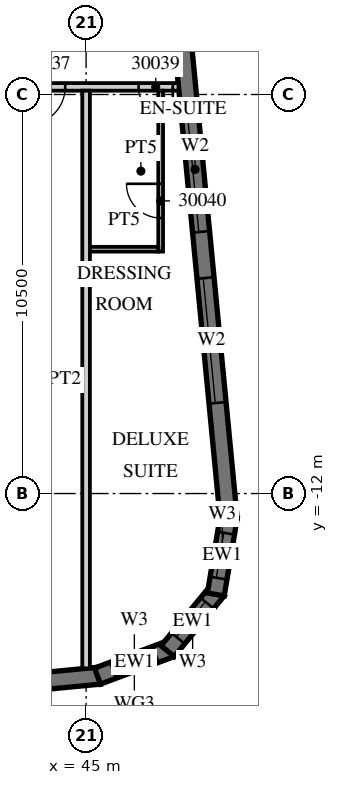
"""IFC4 building model, lengths in metres.
Left out: names, types, materials, properties, quantities, classifications, styles, units other than length and angle.
Written with IfcOpenShell. Run it as: python <this file> out.ifc"""

import sys

from ifc_helpers import new_model, si_unit, direction, frame, frame_2d, origin, place, context, subcontext, project, spatial, polyline, rectangle, outline, extrude, element, fill, save


model = new_model("IFC4")
c1 = context("Model", 3, precision=1e-05, world=origin(), true_north=direction((0.0, 1.0)))
c2 = subcontext(c1, "Body", "Model", "MODEL_VIEW")
j1 = project(units=[si_unit("LENGTHUNIT", "METRE"), si_unit("PLANEANGLEUNIT", "RADIAN")], contexts=[c1])
p1 = place(None, origin())
s1 = spatial("IfcSite", under=j1, at=p1, CompositionType="ELEMENT")
p2 = place(p1, origin())
s2 = spatial("IfcBuilding", under=s1, at=p2, CompositionType="ELEMENT")
p3 = place(p2, frame((0.0, 0.0, 133.9)))
s3 = spatial("IfcBuildingStorey", under=s2, at=p3, CompositionType="ELEMENT", Elevation=133.9)
p4 = place(p3, frame((-13.521, -22.46, 0.0), z_axis=(0.0, 0.0, 1.0), x_axis=(0.995396096335, 0.095846812164, 0.0)))
e1 = element("IfcWall", 1, at=p4, inside=s3, PredefinedType="SOLIDWALL", context=c2, shape_type="SweptSolid", body=[
    extrude(rectangle(XDim=59.151, YDim=0.45, at=frame_2d((29.575, 0.0))), origin(), (0.0, 0.0, 1.0), 3.02),
])
p5 = place(p4, frame((0.91, 0.0, 0.45)))
e2 = element("IfcOpeningElement", 2, at=p5, cuts=e1, PredefinedType="OPENING", context=c2, shape_type="SweptSolid", body=[
    extrude(rectangle(XDim=2.7, YDim=2.25, at=frame_2d((1.35, 1.125))), frame((0.0, 0.235, 0.0), z_axis=(0.0, -1.0, 0.0), x_axis=(1.0, 0.0, 0.0)), (0.0, 0.0, 1.0), 0.47),
])
p6 = place(p4, frame((5.431, 0.0, 0.45)))
e3 = element("IfcOpeningElement", 3, at=p6, cuts=e1, PredefinedType="OPENING", context=c2, shape_type="SweptSolid", body=[
    extrude(rectangle(XDim=2.7, YDim=2.25, at=frame_2d((1.35, 1.125))), frame((0.0, 0.235, 0.0), z_axis=(0.0, -1.0, 0.0), x_axis=(1.0, 0.0, 0.0)), (0.0, 0.0, 1.0), 0.47),
])
p7 = place(p4, frame((9.952, 0.0, 0.45)))
e4 = element("IfcOpeningElement", 4, at=p7, cuts=e1, PredefinedType="OPENING", context=c2, shape_type="SweptSolid", body=[
    extrude(rectangle(XDim=2.7, YDim=2.25, at=frame_2d((1.35, 1.125))), frame((0.0, 0.235, 0.0), z_axis=(0.0, -1.0, 0.0), x_axis=(1.0, 0.0, 0.0)), (0.0, 0.0, 1.0), 0.47),
])
p8 = place(p4, frame((14.473, 0.0, 0.45)))
e5 = element("IfcOpeningElement", 5, at=p8, cuts=e1, PredefinedType="OPENING", context=c2, shape_type="SweptSolid", body=[
    extrude(rectangle(XDim=2.7, YDim=2.25, at=frame_2d((1.35, 1.125))), frame((0.0, 0.235, 0.0), z_axis=(0.0, -1.0, 0.0), x_axis=(1.0, 0.0, 0.0)), (0.0, 0.0, 1.0), 0.47),
])
p9 = place(p4, frame((18.994, 0.0, 0.45)))
e6 = element("IfcOpeningElement", 6, at=p9, cuts=e1, PredefinedType="OPENING", context=c2, shape_type="SweptSolid", body=[
    extrude(rectangle(XDim=2.7, YDim=2.25, at=frame_2d((1.35, 1.125))), frame((0.0, 0.235, 0.0), z_axis=(0.0, -1.0, 0.0), x_axis=(1.0, 0.0, 0.0)), (0.0, 0.0, 1.0), 0.47),
])
p10 = place(p4, frame((23.514, 0.0, 0.45)))
e7 = element("IfcOpeningElement", 7, at=p10, cuts=e1, PredefinedType="OPENING", context=c2, shape_type="SweptSolid", body=[
    extrude(rectangle(XDim=2.7, YDim=2.25, at=frame_2d((1.35, 1.125))), frame((0.0, 0.235, 0.0), z_axis=(0.0, -1.0, 0.0), x_axis=(1.0, 0.0, 0.0)), (0.0, 0.0, 1.0), 0.47),
])
p11 = place(p4, frame((28.035, 0.0, 0.45)))
e8 = element("IfcOpeningElement", 8, at=p11, cuts=e1, PredefinedType="OPENING", context=c2, shape_type="SweptSolid", body=[
    extrude(rectangle(XDim=2.7, YDim=2.25, at=frame_2d((1.35, 1.125))), frame((0.0, 0.235, 0.0), z_axis=(0.0, -1.0, 0.0), x_axis=(1.0, 0.0, 0.0)), (0.0, 0.0, 1.0), 0.47),
])
p12 = place(p4, frame((32.556, 0.0, 0.45)))
e9 = element("IfcOpeningElement", 9, at=p12, cuts=e1, PredefinedType="OPENING", context=c2, shape_type="SweptSolid", body=[
    extrude(rectangle(XDim=2.7, YDim=2.25, at=frame_2d((1.35, 1.125))), frame((0.0, 0.235, 0.0), z_axis=(0.0, -1.0, 0.0), x_axis=(1.0, 0.0, 0.0)), (0.0, 0.0, 1.0), 0.47),
])
p13 = place(p4, frame((37.077, 0.0, 0.45)))
e10 = element("IfcOpeningElement", 10, at=p13, cuts=e1, PredefinedType="OPENING", context=c2, shape_type="SweptSolid", body=[
    extrude(rectangle(XDim=2.7, YDim=2.25, at=frame_2d((1.35, 1.125))), frame((0.0, 0.235, 0.0), z_axis=(0.0, -1.0, 0.0), x_axis=(1.0, 0.0, 0.0)), (0.0, 0.0, 1.0), 0.47),
])
p14 = place(p4, frame((41.598, 0.0, 0.45)))
e11 = element("IfcOpeningElement", 11, at=p14, cuts=e1, PredefinedType="OPENING", context=c2, shape_type="SweptSolid", body=[
    extrude(rectangle(XDim=2.7, YDim=2.25, at=frame_2d((1.35, 1.125))), frame((0.0, 0.235, 0.0), z_axis=(0.0, -1.0, 0.0), x_axis=(1.0, 0.0, 0.0)), (0.0, 0.0, 1.0), 0.47),
])
p15 = place(p4, frame((46.118, 0.0, 0.45)))
e12 = element("IfcOpeningElement", 12, at=p15, cuts=e1, PredefinedType="OPENING", context=c2, shape_type="SweptSolid", body=[
    extrude(rectangle(XDim=2.7, YDim=2.25, at=frame_2d((1.35, 1.125))), frame((0.0, 0.235, 0.0), z_axis=(0.0, -1.0, 0.0), x_axis=(1.0, 0.0, 0.0)), (0.0, 0.0, 1.0), 0.47),
])
p16 = place(p4, frame((50.639, 0.0, 0.45)))
e13 = element("IfcOpeningElement", 13, at=p16, cuts=e1, PredefinedType="OPENING", context=c2, shape_type="SweptSolid", body=[
    extrude(rectangle(XDim=2.7, YDim=2.25, at=frame_2d((1.35, 1.125))), frame((0.0, 0.235, 0.0), z_axis=(0.0, -1.0, 0.0), x_axis=(1.0, 0.0, 0.0)), (0.0, 0.0, 1.0), 0.47),
])
p17 = place(p4, frame((55.15, 0.0, 0.45)))
e14 = element("IfcOpeningElement", 14, at=p17, cuts=e1, PredefinedType="OPENING", context=c2, shape_type="SweptSolid", body=[
    extrude(rectangle(XDim=2.7, YDim=2.25, at=frame_2d((1.35, 1.125))), frame((0.0, 0.235, 0.0), z_axis=(0.0, -1.0, 0.0), x_axis=(1.0, 0.0, 0.0)), (0.0, 0.0, 1.0), 0.47),
])
p18 = place(p3, frame((45.3, -16.804, 0.0), z_axis=(0.0, 0.0, 1.0), x_axis=(0.936677599948, 0.350192909346, 0.0)))
e15 = element("IfcWall", 15, at=p18, inside=s3, PredefinedType="SOLIDWALL", context=c2, shape_type="SweptSolid", body=[
    extrude(outline(polyline([(0.0, -0.225), (2.071, -0.225), (1.95, 0.225), (0.121, 0.225), (0.0, -0.225)])), origin(), (0.0, 0.0, 1.0), 3.02),
])
p19 = place(p18, frame((0.435, 0.0, 0.45)))
e16 = element("IfcOpeningElement", 16, at=p19, cuts=e15, PredefinedType="OPENING", context=c2, shape_type="SweptSolid", body=[
    extrude(rectangle(XDim=1.2, YDim=2.25, at=frame_2d((0.6, 1.125))), frame((0.0, 0.235, 0.0), z_axis=(0.0, -1.0, 0.0), x_axis=(1.0, 0.0, 0.0)), (0.0, 0.0, 1.0), 0.47),
])
p20 = place(p3, frame((47.145, -16.147, 0.0), z_axis=(0.0, 0.0, 1.0), x_axis=(0.635988241739, 0.771698747161, 0.0)))
e17 = element("IfcWall", 17, at=p20, inside=s3, PredefinedType="SOLIDWALL", context=c2, shape_type="SweptSolid", body=[
    extrude(outline(polyline([(0.0, -0.225), (2.071, -0.225), (1.95, 0.225), (0.121, 0.225), (0.0, -0.225)])), origin(), (0.0, 0.0, 1.0), 3.02),
])
p21 = place(p20, frame((0.435, 0.0, 0.45)))
e18 = element("IfcOpeningElement", 18, at=p21, cuts=e17, PredefinedType="OPENING", context=c2, shape_type="SweptSolid", body=[
    extrude(rectangle(XDim=1.2, YDim=2.25, at=frame_2d((0.6, 1.125))), frame((0.0, 0.235, 0.0), z_axis=(0.0, -1.0, 0.0), x_axis=(1.0, 0.0, 0.0)), (0.0, 0.0, 1.0), 0.47),
])
p22 = place(p3, frame((48.413, -14.655, 0.0), z_axis=(0.0, 0.0, 1.0), x_axis=(0.165068144653, 0.986282164302, 0.0)))
e19 = element("IfcWall", 19, at=p22, inside=s3, PredefinedType="SOLIDWALL", context=c2, shape_type="SweptSolid", body=[
    extrude(outline(polyline([(0.0, -0.225), (2.071, -0.225), (1.95, 0.225), (0.121, 0.225), (0.0, -0.225)])), origin(), (0.0, 0.0, 1.0), 3.02),
])
p23 = place(p22, frame((0.435, 0.0, 0.45)))
e20 = element("IfcOpeningElement", 20, at=p23, cuts=e19, PredefinedType="OPENING", context=c2, shape_type="SweptSolid", body=[
    extrude(rectangle(XDim=1.2, YDim=2.25, at=frame_2d((0.6, 1.125))), frame((0.0, 0.235, 0.0), z_axis=(0.0, -1.0, 0.0), x_axis=(1.0, 0.0, 0.0)), (0.0, 0.0, 1.0), 0.47),
])
p24 = place(p3, frame((48.753, -12.672, 0.0), z_axis=(0.0, 0.0, 1.0), x_axis=(-0.095842661909, 0.995396495954, 0.0)))
e21 = element("IfcWall", 21, at=p24, inside=s3, PredefinedType="SOLIDWALL", context=c2, shape_type="SweptSolid", body=[
    extrude(rectangle(XDim=35.0, YDim=0.45, at=frame_2d((17.5, 0.0))), origin(), (0.0, 0.0, 1.0), 3.02),
])
p25 = place(p24, frame((3.072, 0.0, 0.45)))
e22 = element("IfcOpeningElement", 22, at=p25, cuts=e21, PredefinedType="OPENING", context=c2, shape_type="SweptSolid", body=[
    extrude(rectangle(XDim=3.3, YDim=2.25, at=frame_2d((1.65, 1.125))), frame((0.0, 0.235, 0.0), z_axis=(0.0, -1.0, 0.0), x_axis=(1.0, 0.0, 0.0)), (0.0, 0.0, 1.0), 0.47),
])
p26 = place(p24, frame((7.593, 0.0, 0.45)))
e23 = element("IfcOpeningElement", 23, at=p26, cuts=e21, PredefinedType="OPENING", context=c2, shape_type="SweptSolid", body=[
    extrude(rectangle(XDim=3.3, YDim=2.25, at=frame_2d((1.65, 1.125))), frame((0.0, 0.235, 0.0), z_axis=(0.0, -1.0, 0.0), x_axis=(1.0, 0.0, 0.0)), (0.0, 0.0, 1.0), 0.47),
])
p27 = place(p3, frame((-13.5, -1.3, 0.0), z_axis=(0.0, 0.0, 1.0), x_axis=(1.0, 0.0, 0.0)))
e24 = element("IfcWall", 24, at=p27, inside=s3, PredefinedType="PARTITIONING", context=c2, shape_type="SweptSolid", body=[
    extrude(rectangle(XDim=60.932, YDim=0.2, at=frame_2d((30.466, 0.0))), origin(), (0.0, 0.0, 1.0), 3.02),
])
p28 = place(p27, frame((2.925, 0.0, 0.0)))
e25 = element("IfcOpeningElement", 25, at=p28, cuts=e24, PredefinedType="OPENING", context=c2, shape_type="SweptSolid", body=[
    extrude(rectangle(XDim=1.0, YDim=2.1, at=frame_2d((0.5, 1.05))), frame((0.0, 0.11, 0.0), z_axis=(0.0, -1.0, 0.0), x_axis=(1.0, 0.0, 0.0)), (0.0, 0.0, 1.0), 0.22),
])
p29 = place(p27, frame((9.863, 0.0, 0.0)))
e26 = element("IfcOpeningElement", 26, at=p29, cuts=e24, PredefinedType="OPENING", context=c2, shape_type="SweptSolid", body=[
    extrude(rectangle(XDim=1.2, YDim=2.1, at=frame_2d((0.6, 1.05))), frame((0.0, 0.11, 0.0), z_axis=(0.0, -1.0, 0.0), x_axis=(1.0, 0.0, 0.0)), (0.0, 0.0, 1.0), 0.22),
])
p30 = place(p27, frame((14.075, 0.0, 0.0)))
e27 = element("IfcOpeningElement", 27, at=p30, cuts=e24, PredefinedType="OPENING", context=c2, shape_type="SweptSolid", body=[
    extrude(rectangle(XDim=1.0, YDim=2.1, at=frame_2d((0.5, 1.05))), frame((0.0, 0.11, 0.0), z_axis=(0.0, -1.0, 0.0), x_axis=(1.0, 0.0, 0.0)), (0.0, 0.0, 1.0), 0.22),
])
p31 = place(p27, frame((18.55, 0.0, 0.0)))
e28 = element("IfcOpeningElement", 28, at=p31, cuts=e24, PredefinedType="OPENING", context=c2, shape_type="SweptSolid", body=[
    extrude(rectangle(XDim=1.0, YDim=2.1, at=frame_2d((0.5, 1.05))), frame((0.0, 0.11, 0.0), z_axis=(0.0, -1.0, 0.0), x_axis=(1.0, 0.0, 0.0)), (0.0, 0.0, 1.0), 0.22),
])
p32 = place(p27, frame((24.938, 0.0, 0.0)))
e29 = element("IfcOpeningElement", 29, at=p32, cuts=e24, PredefinedType="OPENING", context=c2, shape_type="SweptSolid", body=[
    extrude(rectangle(XDim=1.2, YDim=2.1, at=frame_2d((0.6, 1.05))), frame((0.0, 0.11, 0.0), z_axis=(0.0, -1.0, 0.0), x_axis=(1.0, 0.0, 0.0)), (0.0, 0.0, 1.0), 0.22),
])
p33 = place(p27, frame((36.862, 0.0, 0.0)))
e30 = element("IfcOpeningElement", 30, at=p33, cuts=e24, PredefinedType="OPENING", context=c2, shape_type="SweptSolid", body=[
    extrude(rectangle(XDim=1.2, YDim=2.1, at=frame_2d((0.6, 1.05))), frame((0.0, 0.11, 0.0), z_axis=(0.0, -1.0, 0.0), x_axis=(1.0, 0.0, 0.0)), (0.0, 0.0, 1.0), 0.22),
])
p34 = place(p27, frame((41.075, 0.0, 0.0)))
e31 = element("IfcOpeningElement", 31, at=p34, cuts=e24, PredefinedType="OPENING", context=c2, shape_type="SweptSolid", body=[
    extrude(rectangle(XDim=1.0, YDim=2.1, at=frame_2d((0.5, 1.05))), frame((0.0, 0.11, 0.0), z_axis=(0.0, -1.0, 0.0), x_axis=(1.0, 0.0, 0.0)), (0.0, 0.0, 1.0), 0.22),
])
p35 = place(p27, frame((45.55, 0.0, 0.0)))
e32 = element("IfcOpeningElement", 32, at=p35, cuts=e24, PredefinedType="OPENING", context=c2, shape_type="SweptSolid", body=[
    extrude(rectangle(XDim=1.0, YDim=2.1, at=frame_2d((0.5, 1.05))), frame((0.0, 0.11, 0.0), z_axis=(0.0, -1.0, 0.0), x_axis=(1.0, 0.0, 0.0)), (0.0, 0.0, 1.0), 0.22),
])
p36 = place(p27, frame((52.425, 0.0, 0.0)))
e33 = element("IfcOpeningElement", 33, at=p36, cuts=e24, PredefinedType="OPENING", context=c2, shape_type="SweptSolid", body=[
    extrude(rectangle(XDim=1.0, YDim=2.1, at=frame_2d((0.5, 1.05))), frame((0.0, 0.11, 0.0), z_axis=(0.0, -1.0, 0.0), x_axis=(1.0, 0.0, 0.0)), (0.0, 0.0, 1.0), 0.22),
])
p37 = place(p27, frame((56.95, 0.0, 0.0)))
e34 = element("IfcOpeningElement", 34, at=p37, cuts=e24, PredefinedType="OPENING", context=c2, shape_type="SweptSolid", body=[
    extrude(rectangle(XDim=1.0, YDim=2.1, at=frame_2d((0.5, 1.05))), frame((0.0, 0.11, 0.0), z_axis=(0.0, -1.0, 0.0), x_axis=(1.0, 0.0, 0.0)), (0.0, 0.0, 1.0), 0.22),
])
p38 = place(p27, frame((59.882, 0.0, 0.0)))
e35 = element("IfcOpeningElement", 35, at=p38, cuts=e24, PredefinedType="OPENING", context=c2, shape_type="SweptSolid", body=[
    extrude(rectangle(XDim=0.9, YDim=2.1, at=frame_2d((0.45, 1.05))), frame((0.0, 0.11, 0.0), z_axis=(0.0, -1.0, 0.0), x_axis=(1.0, 0.0, 0.0)), (0.0, 0.0, 1.0), 0.22),
])
p39 = place(p3, frame((45.0, -16.599, 0.0), z_axis=(0.0, 0.0, 1.0), x_axis=(0.0, 1.0, 0.0)))
e36 = element("IfcWall", 36, at=p39, inside=s3, PredefinedType="PARTITIONING", context=c2, shape_type="SweptSolid", body=[
    extrude(rectangle(XDim=15.199, YDim=0.2, at=frame_2d((7.6, 0.0))), origin(), (0.0, 0.0, 1.0), 3.02),
])
p40 = place(p3, frame((46.962, -5.634, 0.0), z_axis=(0.0, 0.0, 1.0), x_axis=(0.0, 1.0, 0.0)))
e37 = element("IfcWall", 37, at=p40, inside=s3, PredefinedType="PARTITIONING", context=c2, shape_type="SweptSolid", body=[
    extrude(rectangle(XDim=4.234, YDim=0.125, at=frame_2d((2.117, 0.0))), origin(), (0.0, 0.0, 1.0), 3.02),
])
p41 = place(p40, frame((0.884, 0.0, 0.0)))
e38 = element("IfcOpeningElement", 38, at=p41, cuts=e37, PredefinedType="OPENING", context=c2, shape_type="SweptSolid", body=[
    extrude(rectangle(XDim=0.9, YDim=2.1, at=frame_2d((0.45, 1.05))), frame((0.0, 0.073, 0.0), z_axis=(0.0, -1.0, 0.0), x_axis=(1.0, 0.0, 0.0)), (0.0, 0.0, 1.0), 0.145),
])
p42 = place(p3, frame((45.1, -5.572, 0.0), z_axis=(0.0, 0.0, 1.0), x_axis=(1.0, 0.0, 0.0)))
e39 = element("IfcWall", 39, at=p42, inside=s3, PredefinedType="PARTITIONING", context=c2, shape_type="SweptSolid", body=[
    extrude(rectangle(XDim=1.8, YDim=0.125, at=frame_2d((0.9, 0.0))), origin(), (0.0, 0.0, 1.0), 3.02),
])
p43 = place(p19, origin())
e40 = element("IfcWindow", 40, at=p43, inside=s3, PartitioningType="SINGLE_PANEL", PredefinedType="WINDOW", context=c2, shape_type="SweptSolid", body=[
    extrude(rectangle(XDim=1.2, YDim=2.25, at=frame_2d((0.6, 1.125))), frame((0.0, 0.09, 0.0), z_axis=(0.0, -1.0, 0.0), x_axis=(1.0, 0.0, 0.0)), (0.0, 0.0, 1.0), 0.06),
])
fill(e16, e40)
p44 = place(p21, origin())
e41 = element("IfcWindow", 41, at=p44, inside=s3, PartitioningType="SINGLE_PANEL", PredefinedType="WINDOW", context=c2, shape_type="SweptSolid", body=[
    extrude(rectangle(XDim=1.2, YDim=2.25, at=frame_2d((0.6, 1.125))), frame((0.0, 0.09, 0.0), z_axis=(0.0, -1.0, 0.0), x_axis=(1.0, 0.0, 0.0)), (0.0, 0.0, 1.0), 0.06),
])
fill(e18, e41)
p45 = place(p23, origin())
e42 = element("IfcWindow", 42, at=p45, inside=s3, PartitioningType="SINGLE_PANEL", PredefinedType="WINDOW", context=c2, shape_type="SweptSolid", body=[
    extrude(rectangle(XDim=1.2, YDim=2.25, at=frame_2d((0.6, 1.125))), frame((0.0, 0.09, 0.0), z_axis=(0.0, -1.0, 0.0), x_axis=(1.0, 0.0, 0.0)), (0.0, 0.0, 1.0), 0.06),
])
fill(e20, e42)
p46 = place(p25, origin())
e43 = element("IfcWindow", 43, at=p46, inside=s3, PartitioningType="SINGLE_PANEL", PredefinedType="WINDOW", context=c2, shape_type="SweptSolid", body=[
    extrude(rectangle(XDim=3.3, YDim=2.25, at=frame_2d((1.65, 1.125))), frame((0.0, 0.09, 0.0), z_axis=(0.0, -1.0, 0.0), x_axis=(1.0, 0.0, 0.0)), (0.0, 0.0, 1.0), 0.06),
])
fill(e22, e43)
p47 = place(p26, origin())
e44 = element("IfcWindow", 44, at=p47, inside=s3, PartitioningType="SINGLE_PANEL", PredefinedType="WINDOW", context=c2, shape_type="SweptSolid", body=[
    extrude(rectangle(XDim=3.3, YDim=2.25, at=frame_2d((1.65, 1.125))), frame((0.0, 0.09, 0.0), z_axis=(0.0, -1.0, 0.0), x_axis=(1.0, 0.0, 0.0)), (0.0, 0.0, 1.0), 0.06),
])
fill(e23, e44)
p48 = place(p37, origin())
e45 = element("IfcDoor", 45, at=p48, inside=s3, OperationType="SINGLE_SWING_LEFT", PredefinedType="DOOR", context=c2, shape_type="SweptSolid", body=[
    extrude(rectangle(XDim=1.0, YDim=2.1, at=frame_2d((0.5, 1.05))), frame((0.0, 0.025, 0.0), z_axis=(0.0, -1.0, 0.0), x_axis=(1.0, 0.0, 0.0)), (0.0, 0.0, 1.0), 0.05),
])
fill(e34, e45)
p49 = place(p38, origin())
e46 = element("IfcDoor", 46, at=p49, inside=s3, OperationType="SINGLE_SWING_RIGHT", PredefinedType="DOOR", context=c2, shape_type="SweptSolid", body=[
    extrude(rectangle(XDim=0.9, YDim=2.1, at=frame_2d((0.45, 1.05))), frame((0.0, 0.025, 0.0), z_axis=(0.0, -1.0, 0.0), x_axis=(1.0, 0.0, 0.0)), (0.0, 0.0, 1.0), 0.05),
])
fill(e35, e46)
p50 = place(p41, origin())
e47 = element("IfcDoor", 47, at=p50, inside=s3, OperationType="SINGLE_SWING_RIGHT", PredefinedType="DOOR", context=c2, shape_type="SweptSolid", body=[
    extrude(rectangle(XDim=0.9, YDim=2.1, at=frame_2d((0.45, 1.05))), frame((0.0, 0.025, 0.0), z_axis=(0.0, -1.0, 0.0), x_axis=(1.0, 0.0, 0.0)), (0.0, 0.0, 1.0), 0.05),
])
fill(e38, e47)
save(model, sys.argv[1])
